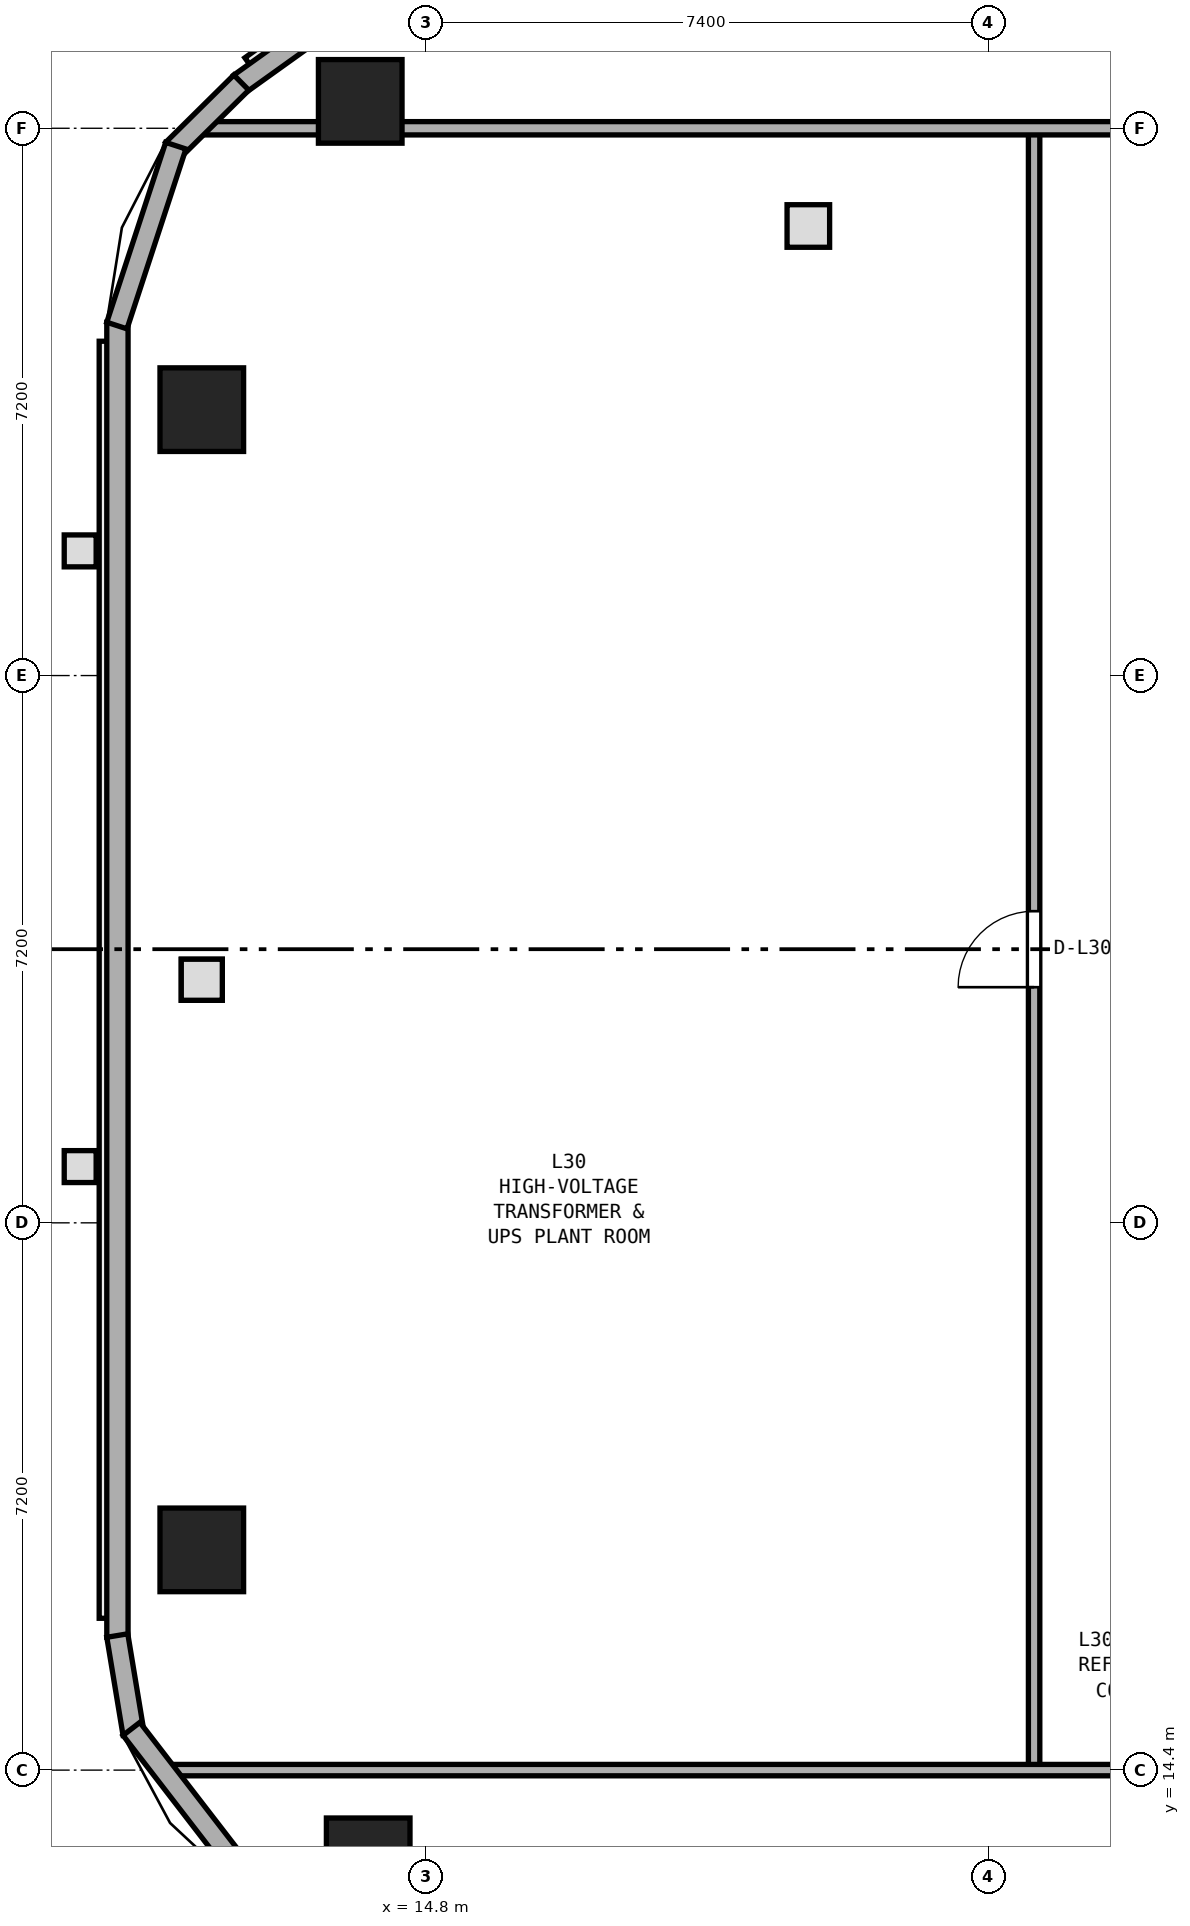
"""IFC4 building model, lengths in metres.
Left out: names, types, materials, properties, quantities, classifications, styles, units other than length and angle.
Written with IfcOpenShell. Run it as: python <this file> out.ifc"""

import sys

from ifc_helpers import new_model, si_unit, direction, frame, frame_2d, origin, origin_2d, place, context, subcontext, project, spatial, rectangle, extrude, element, fill, save


model = new_model("IFC4")
c1 = context("Model", 3, precision=1e-05, world=origin(), true_north=direction((0.0, 1.0)))
c2 = subcontext(c1, "Body", "Model", "MODEL_VIEW")
j1 = project(units=[si_unit("LENGTHUNIT", "METRE"), si_unit("PLANEANGLEUNIT", "RADIAN")], contexts=[c1])
p1 = place(None, origin())
s1 = spatial("IfcSite", under=j1, at=p1, CompositionType="ELEMENT")
p2 = place(p1, origin())
s2 = spatial("IfcBuilding", under=s1, at=p2, CompositionType="ELEMENT")
p3 = place(p2, frame((0.0, 0.0, 120.0)))
s3 = spatial("IfcBuildingStorey", under=s2, at=p3, CompositionType="ELEMENT", Elevation=120.0)
for number, where, z_axis, x_axis in (
    (1, (13.934, 36.354, 0.0), (0.0, 0.0, 1.0), (1.0, 0.0, 0.0)),
    (2, (11.85, 32.298, 0.0), (0.0, 0.0, 1.0), (1.0, 0.0, 0.0)),
    (3, (11.85, 17.298, 0.0), (0.0, 0.0, 1.0), (1.0, 0.0, 0.0)),
    (4, (14.039, 13.22, 0.0), (0.0, 0.0, 1.0), (1.0, 0.0, 0.0)),
):
    element("IfcColumn", number, at=place(p3, frame(where, z_axis=z_axis, x_axis=x_axis)), inside=s3, PredefinedType="COLUMN", context=c2, shape_type="SweptSolid", body=[
        extrude(rectangle(XDim=1.1, YDim=1.1, at=origin_2d()), origin(), (0.0, 0.0, 1.0), 5.0),
    ])
p4 = place(p3, frame((22.8, 14.4, 0.0), z_axis=(0.0, 0.0, 1.0), x_axis=(0.0, 1.0, 0.0)))
e5 = element("IfcWall", 5, at=p4, inside=s3, PredefinedType="PARTITIONING", context=c2, shape_type="SweptSolid", body=[
    extrude(rectangle(XDim=21.6, YDim=0.15, at=frame_2d((10.8, 0.0))), origin(), (0.0, 0.0, 1.0), 4.6),
])
p5 = place(p4, frame((10.3, 0.0, 0.0)))
e6 = element("IfcOpeningElement", 6, at=p5, cuts=e5, PredefinedType="OPENING", context=c2, shape_type="SweptSolid", body=[
    extrude(rectangle(XDim=1.0, YDim=2.04, at=frame_2d((0.5, 1.02))), frame((0.0, 0.085, 0.0), z_axis=(0.0, -1.0, 0.0), x_axis=(1.0, 0.0, 0.0)), (0.0, 0.0, 1.0), 0.17),
])
p6 = place(p3, frame((11.264, 14.4, 0.0), z_axis=(0.0, 0.0, 1.0), x_axis=(1.0, 0.0, 0.0)))
e7 = element("IfcWall", 7, at=p6, inside=s3, PredefinedType="PARTITIONING", context=c2, shape_type="SweptSolid", body=[
    extrude(rectangle(XDim=53.009, YDim=0.15, at=frame_2d((26.504, 0.0))), origin(), (0.0, 0.0, 1.0), 2.2),
])
p7 = place(p6, frame((25.236, 0.0, 0.0)))
e8 = element("IfcOpeningElement", 8, at=p7, cuts=e7, PredefinedType="OPENING", context=c2, shape_type="SweptSolid", body=[
    extrude(rectangle(XDim=1.0, YDim=2.04, at=frame_2d((0.5, 1.02))), frame((0.0, 0.085, 0.0), z_axis=(0.0, -1.0, 0.0), x_axis=(1.0, 0.0, 0.0)), (0.0, 0.0, 1.0), 0.17),
])
p8 = place(p3, frame((11.703, 36.0, 0.0), z_axis=(0.0, 0.0, 1.0), x_axis=(1.0, 0.0, 0.0)))
e9 = element("IfcWall", 9, at=p8, inside=s3, PredefinedType="PARTITIONING", context=c2, shape_type="SweptSolid", body=[
    extrude(rectangle(XDim=52.993, YDim=0.175, at=frame_2d((26.497, 0.0))), origin(), (0.0, 0.0, 1.0), 2.2),
])
p9 = place(p8, frame((24.797, 0.0, 0.0)))
e10 = element("IfcOpeningElement", 10, at=p9, cuts=e9, PredefinedType="OPENING", context=c2, shape_type="SweptSolid", body=[
    extrude(rectangle(XDim=1.0, YDim=2.04, at=frame_2d((0.5, 1.02))), frame((0.0, 0.097, 0.0), z_axis=(0.0, -1.0, 0.0), x_axis=(1.0, 0.0, 0.0)), (0.0, 0.0, 1.0), 0.195),
])
p10 = place(p3, frame((26.634, 46.81, 0.0), z_axis=(0.0, 0.0, 1.0), x_axis=(-0.813113097485, -0.582105738417, 0.0)))
e11 = element("IfcWall", 11, at=p10, inside=s3, PredefinedType="STANDARD", context=c2, shape_type="SweptSolid", body=[
    extrude(rectangle(XDim=17.563, YDim=0.28, at=frame_2d((8.781, 0.0))), origin(), (0.0, 0.0, 1.0), 4.6),
])
p11 = place(p3, frame((10.74, 33.448, 0.0), z_axis=(0.0, 0.0, 1.0), x_axis=(0.0, -1.0, 0.0)))
e12 = element("IfcWall", 12, at=p11, inside=s3, PredefinedType="STANDARD", context=c2, shape_type="SweptSolid", body=[
    extrude(rectangle(XDim=17.301, YDim=0.28, at=frame_2d((8.65, 0.0))), origin(), (0.0, 0.0, 1.0), 3.907),
])
p12 = place(p3, frame((12.37, 36.601, 0.0), z_axis=(0.0, 0.0, 1.0), x_axis=(-0.711257890723, -0.702931157998, 0.0)))
e13 = element("IfcWall", 13, at=p12, inside=s3, PredefinedType="STANDARD", context=c2, shape_type="SweptSolid", body=[
    extrude(rectangle(XDim=1.261, YDim=0.28, at=frame_2d((0.63, 0.0))), origin(), (0.0, 0.0, 1.0), 4.6),
])
p13 = place(p3, frame((11.508, 35.771, 0.0), z_axis=(0.0, 0.0, 1.0), x_axis=(-0.311193632475, -0.950346527908, 0.0)))
e14 = element("IfcWall", 14, at=p13, inside=s3, PredefinedType="STANDARD", context=c2, shape_type="SweptSolid", body=[
    extrude(rectangle(XDim=2.49, YDim=0.28, at=frame_2d((1.245, 0.0))), origin(), (0.0, 0.0, 1.0), 4.6),
])
p14 = place(p3, frame((10.738, 16.17, 0.0), z_axis=(0.0, 0.0, 1.0), x_axis=(0.163490970766, -0.986544830445, 0.0)))
e15 = element("IfcWall", 15, at=p14, inside=s3, PredefinedType="STANDARD", context=c2, shape_type="SweptSolid", body=[
    extrude(rectangle(XDim=1.308, YDim=0.28, at=frame_2d((0.654, 0.0))), origin(), (0.0, 0.0, 1.0), 4.6),
])
p15 = place(p3, frame((10.925, 14.943, 0.0), z_axis=(0.0, 0.0, 1.0), x_axis=(0.610647549787, -0.791902500273, 0.0)))
e16 = element("IfcWall", 16, at=p15, inside=s3, PredefinedType="STANDARD", context=c2, shape_type="SweptSolid", body=[
    extrude(rectangle(XDim=2.581, YDim=0.28, at=frame_2d((1.291, 0.0))), origin(), (0.0, 0.0, 1.0), 4.6),
])
p16 = place(p5, origin())
e17 = element("IfcDoor", 17, at=p16, inside=s3, OperationType="SINGLE_SWING_LEFT", PredefinedType="DOOR", context=c2, shape_type="SweptSolid", body=[
    extrude(rectangle(XDim=1.0, YDim=2.04, at=frame_2d((0.5, 1.02))), frame((0.0, 0.025, 0.0), z_axis=(0.0, -1.0, 0.0), x_axis=(1.0, 0.0, 0.0)), (0.0, 0.0, 1.0), 0.05),
])
fill(e6, e17)
save(model, sys.argv[1])
